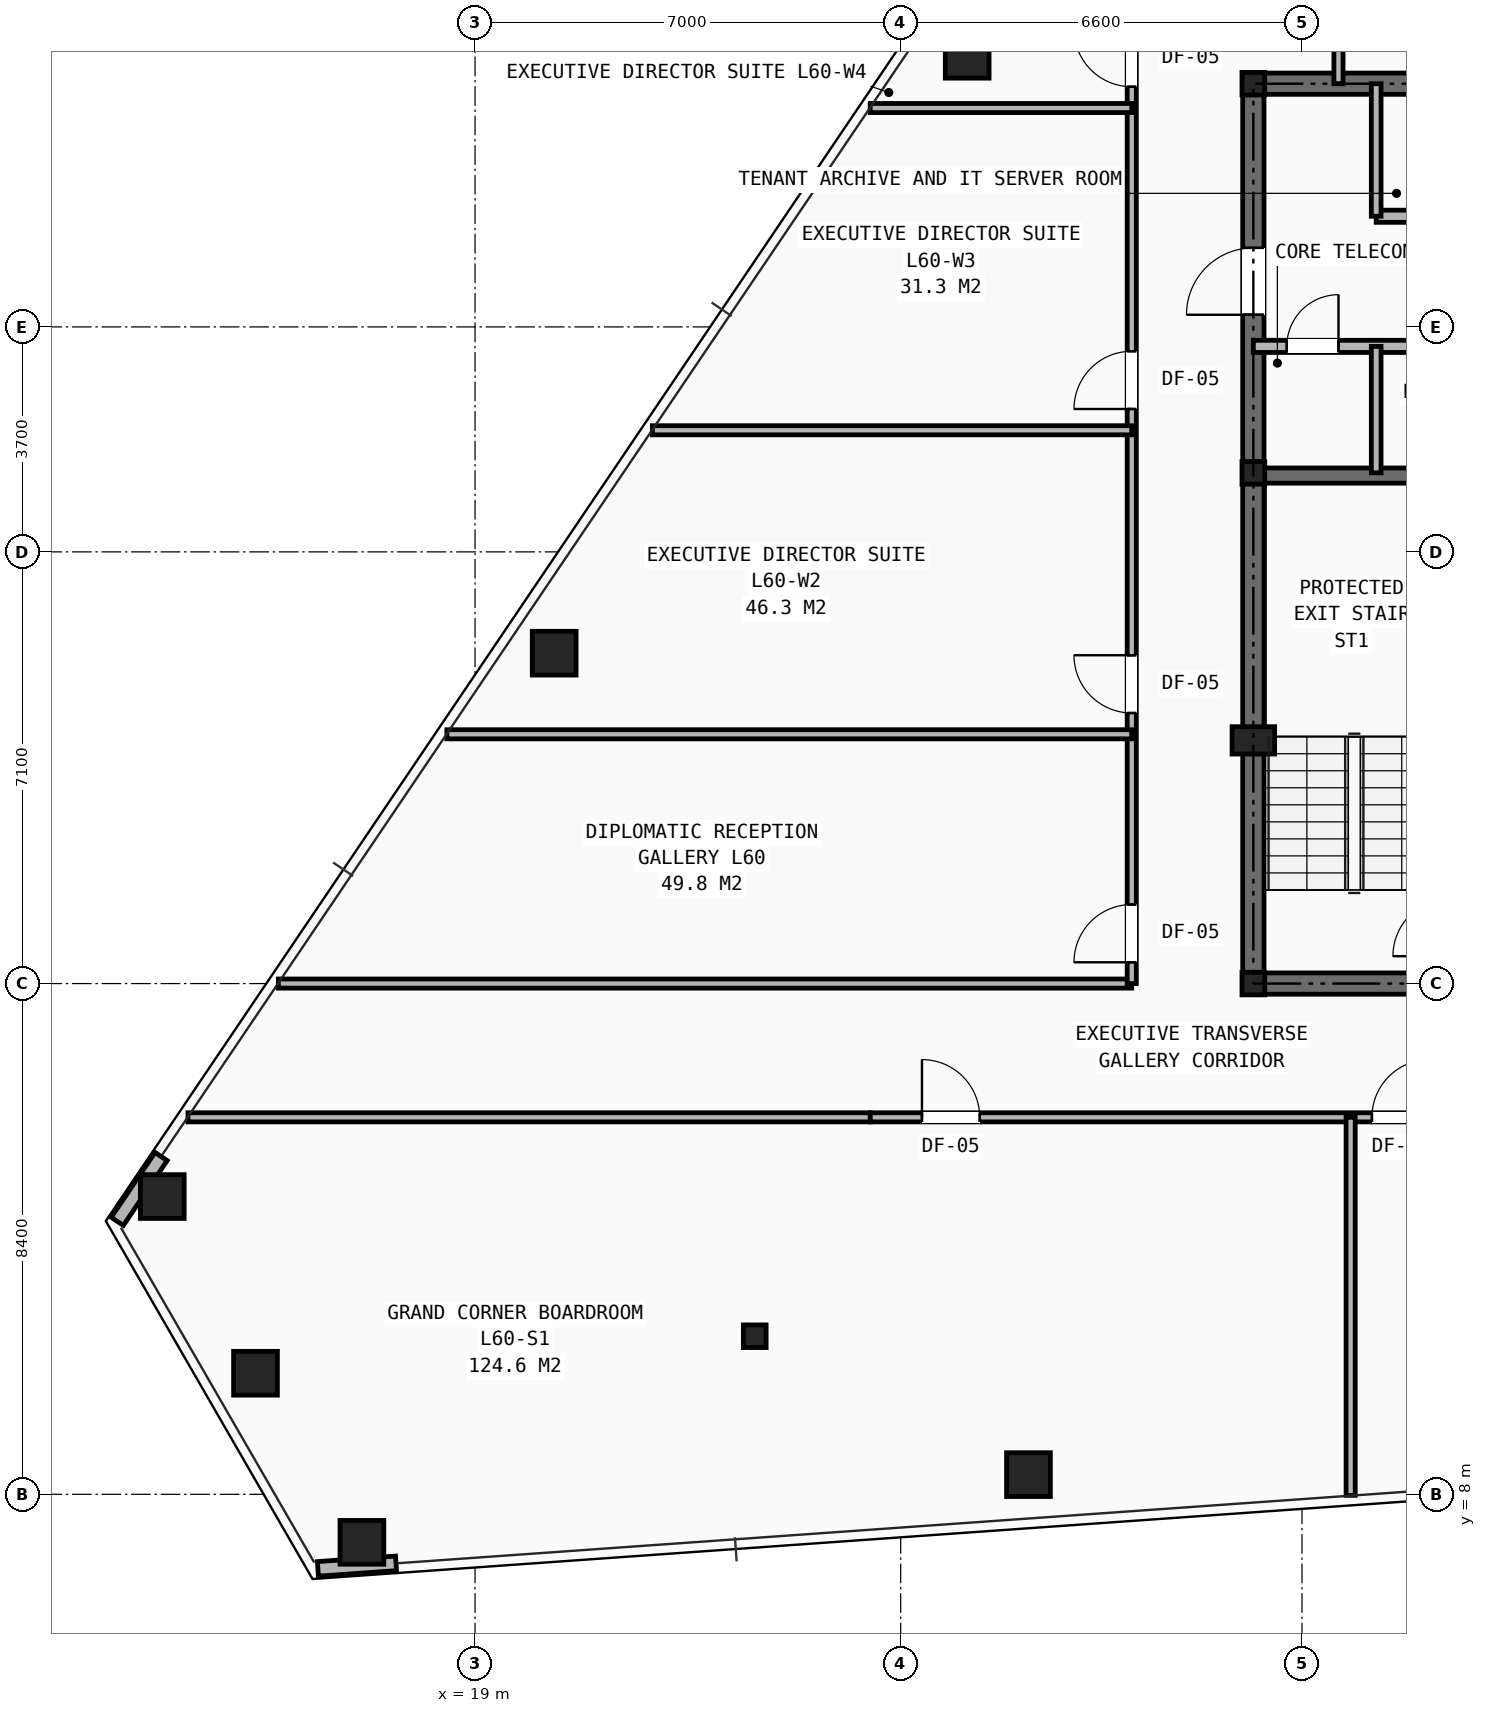
"""IFC4 building model, lengths in metres.
Left out: names, types, materials, properties, quantities, classifications, styles, units other than length and angle.
Written with IfcOpenShell. Run it as: python <this file> out.ifc"""

import sys

from ifc_helpers import new_model, si_unit, direction, frame, frame_2d, origin, origin_2d, place, context, subcontext, project, spatial, rectangle, hollow_rectangle, i_section, extrude, element, fill, save


model = new_model("IFC4")
c1 = context("Model", 3, precision=1e-05, world=origin(), true_north=direction((0.0, 1.0)))
c2 = subcontext(c1, "Body", "Model", "MODEL_VIEW")
j1 = project(units=[si_unit("LENGTHUNIT", "METRE"), si_unit("PLANEANGLEUNIT", "RADIAN")], contexts=[c1])
p1 = place(None, origin())
s1 = spatial("IfcSite", under=j1, at=p1, CompositionType="ELEMENT")
p2 = place(p1, origin())
s2 = spatial("IfcBuilding", under=s1, at=p2, CompositionType="ELEMENT")
p3 = place(p2, frame((0.0, 0.0, 211.9)))
s3 = spatial("IfcBuildingStorey", under=s2, at=p3, CompositionType="ELEMENT", Elevation=211.9)
for number, where, z_axis, x_axis in (
    (1, (31.8, 16.4, 0.0), (0.0, 0.0, 1.0), (1.0, 0.0, 0.0)),
    (2, (31.8, 24.8, 0.0), (0.0, 0.0, 1.0), (1.0, 0.0, 0.0)),
    (3, (31.8, 31.2, 0.0), (0.0, 0.0, 1.0), (1.0, 0.0, 0.0)),
    (4, (23.6, 10.6, 0.0), (0.0, 0.0, 1.0), (1.0, 0.0, 0.0)),
):
    element("IfcColumn", number, at=place(p3, frame(where, z_axis=z_axis, x_axis=x_axis)), inside=s3, PredefinedType="COLUMN", context=c2, shape_type="SweptSolid", body=[
        extrude(i_section(OverallWidth=0.374, OverallDepth=0.372, WebThickness=0.016, FlangeThickness=0.026, at=origin_2d()), origin(), (0.0, 0.0, 1.0), 3.5),
    ])
p4 = place(p3, frame((31.8, 20.4, 0.0), z_axis=(0.0, 0.0, 1.0), x_axis=(1.0, 0.0, 0.0)))
e5 = element("IfcColumn", 5, at=p4, inside=s3, PredefinedType="PILASTER", context=c2, shape_type="SweptSolid", body=[
    extrude(rectangle(XDim=0.7, YDim=0.45, at=origin_2d()), origin(), (0.0, 0.0, 1.0), 3.5),
])
for number, where, z_axis, x_axis in (
    (6, (27.094, 31.652, 0.0), (0.0, 0.0, 1.0), (1.0, 0.0, 0.0)),
    (7, (20.302, 21.834, 0.0), (0.0, 0.0, 1.0), (1.0, 0.0, 0.0)),
    (8, (13.856, 12.897, 0.0), (0.0, 0.0, 1.0), (1.0, 0.0, 0.0)),
    (9, (15.389, 9.991, 0.0), (0.0, 0.0, 1.0), (1.0, 0.0, 0.0)),
    (10, (17.14, 7.21, 0.0), (0.0, 0.0, 1.0), (1.0, 0.0, 0.0)),
    (11, (28.102, 8.323, 0.0), (0.0, 0.0, 1.0), (1.0, 0.0, 0.0)),
):
    element("IfcColumn", number, at=place(p3, frame(where, z_axis=z_axis, x_axis=x_axis)), inside=s3, PredefinedType="COLUMN", context=c2, shape_type="SweptSolid", body=[
        extrude(hollow_rectangle(XDim=0.72, YDim=0.72, WallThickness=0.05, at=origin_2d()), origin(), (0.0, 0.0, 1.0), 3.5),
    ])
p5 = place(p3, frame((13.837, 13.556, 0.0), z_axis=(0.0, 0.0, 1.0), x_axis=(-0.559984079849, -0.828503367715, 0.0)))
e12 = element("IfcWall", 12, at=p5, inside=s3, PredefinedType="SHEAR", context=c2, shape_type="SweptSolid", body=[
    extrude(rectangle(XDim=1.287, YDim=0.24, at=frame_2d((0.644, 0.0))), origin(), (0.0, 0.0, 1.0), 2.623),
])
p6 = place(p3, frame((16.416, 6.773, 0.0), z_axis=(0.0, 0.0, 1.0), x_axis=(0.997482703795, 0.070910194111, 0.0)))
e13 = element("IfcWall", 13, at=p6, inside=s3, PredefinedType="SHEAR", context=c2, shape_type="SweptSolid", body=[
    extrude(rectangle(XDim=1.288, YDim=0.24, at=frame_2d((0.644, 0.0))), origin(), (0.0, 0.0, 1.0), 2.623),
])
p7 = place(p3, frame((31.8, 16.4, 0.0), z_axis=(0.0, 0.0, 1.0), x_axis=(1.0, 0.0, 0.0)))
e14 = element("IfcWall", 14, at=p7, inside=s3, PredefinedType="SHEAR", context=c2, shape_type="SweptSolid", body=[
    extrude(rectangle(XDim=16.4, YDim=0.35, at=frame_2d((8.2, 0.0))), origin(), (0.0, 0.0, 1.0), 3.25),
])
p8 = place(p7, frame((7.75, 0.0, 0.0)))
e15 = element("IfcOpeningElement", 15, at=p8, cuts=e14, PredefinedType="OPENING", context=c2, shape_type="SweptSolid", body=[
    extrude(rectangle(XDim=0.9, YDim=2.1, at=frame_2d((0.45, 1.05))), frame((0.0, 0.185, 0.0), z_axis=(0.0, -1.0, 0.0), x_axis=(1.0, 0.0, 0.0)), (0.0, 0.0, 1.0), 0.37),
])
p9 = place(p7, frame((4.2, 0.0, 0.0)))
e16 = element("IfcOpeningElement", 16, at=p9, cuts=e14, PredefinedType="OPENING", context=c2, shape_type="SweptSolid", body=[
    extrude(rectangle(XDim=0.95, YDim=2.1, at=frame_2d((0.475, 1.05))), frame((0.0, 0.185, 0.0), z_axis=(0.0, -1.0, 0.0), x_axis=(1.0, 0.0, 0.0)), (0.0, 0.0, 1.0), 0.37),
])
p10 = place(p7, frame((10.6, 0.0, 0.0)))
e17 = element("IfcOpeningElement", 17, at=p10, cuts=e14, PredefinedType="OPENING", context=c2, shape_type="SweptSolid", body=[
    extrude(rectangle(XDim=0.95, YDim=2.1, at=frame_2d((0.475, 1.05))), frame((0.0, 0.185, 0.0), z_axis=(0.0, -1.0, 0.0), x_axis=(1.0, 0.0, 0.0)), (0.0, 0.0, 1.0), 0.37),
])
p11 = place(p3, frame((31.8, 31.2, 0.0), z_axis=(0.0, 0.0, 1.0), x_axis=(1.0, 0.0, 0.0)))
e18 = element("IfcWall", 18, at=p11, inside=s3, PredefinedType="SHEAR", context=c2, shape_type="SweptSolid", body=[
    extrude(rectangle(XDim=16.4, YDim=0.35, at=frame_2d((8.2, 0.0))), origin(), (0.0, 0.0, 1.0), 3.25),
])
p12 = place(p3, frame((31.8, 16.4, 0.0), z_axis=(0.0, 0.0, 1.0), x_axis=(0.0, 1.0, 0.0)))
e19 = element("IfcWall", 19, at=p12, inside=s3, PredefinedType="SHEAR", context=c2, shape_type="SweptSolid", body=[
    extrude(rectangle(XDim=14.8, YDim=0.35, at=frame_2d((7.4, 0.0))), origin(), (0.0, 0.0, 1.0), 3.25),
])
p13 = place(p12, frame((11.0, 0.0, 0.0)))
e20 = element("IfcOpeningElement", 20, at=p13, cuts=e19, PredefinedType="OPENING", context=c2, shape_type="SweptSolid", body=[
    extrude(rectangle(XDim=1.1, YDim=2.15, at=frame_2d((0.55, 1.075))), frame((0.0, 0.185, 0.0), z_axis=(0.0, -1.0, 0.0), x_axis=(1.0, 0.0, 0.0)), (0.0, 0.0, 1.0), 0.37),
])
p14 = place(p3, frame((31.8, 24.755, 0.0), z_axis=(0.0, 0.0, 1.0), x_axis=(1.0, 0.0, 0.0)))
e21 = element("IfcWall", 21, at=p14, inside=s3, PredefinedType="SHEAR", context=c2, shape_type="SweptSolid", body=[
    extrude(rectangle(XDim=3.245, YDim=0.25, at=frame_2d((1.623, 0.0))), origin(), (0.0, 0.0, 1.0), 3.25),
])
p15 = place(p3, frame((33.82, 29.02, 0.0), z_axis=(0.0, 0.0, 1.0), x_axis=(1.0, 0.0, 0.0)))
e22 = element("IfcWall", 22, at=p15, inside=s3, PredefinedType="SOLIDWALL", context=c2, shape_type="SweptSolid", body=[
    extrude(rectangle(XDim=14.38, YDim=0.2, at=frame_2d((7.19, 0.0))), origin(), (0.0, 0.0, 1.0), 2.705),
])
p16 = place(p15, frame((1.78, 0.0, 0.0)))
e23 = element("IfcOpeningElement", 23, at=p16, cuts=e22, PredefinedType="OPENING", context=c2, shape_type="SweptSolid", body=[
    extrude(rectangle(XDim=0.9, YDim=2.1, at=frame_2d((0.45, 1.05))), frame((0.0, 0.11, 0.0), z_axis=(0.0, -1.0, 0.0), x_axis=(1.0, 0.0, 0.0)), (0.0, 0.0, 1.0), 0.22),
])
p17 = place(p15, frame((6.07, 0.0, 0.0)))
e24 = element("IfcOpeningElement", 24, at=p17, cuts=e22, PredefinedType="OPENING", context=c2, shape_type="SweptSolid", body=[
    extrude(rectangle(XDim=0.9, YDim=2.1, at=frame_2d((0.45, 1.05))), frame((0.0, 0.11, 0.0), z_axis=(0.0, -1.0, 0.0), x_axis=(1.0, 0.0, 0.0)), (0.0, 0.0, 1.0), 0.22),
])
p18 = place(p15, frame((9.39, 0.0, 0.0)))
e25 = element("IfcOpeningElement", 25, at=p18, cuts=e22, PredefinedType="OPENING", context=c2, shape_type="SweptSolid", body=[
    extrude(rectangle(XDim=1.1, YDim=2.15, at=frame_2d((0.55, 1.075))), frame((0.0, 0.11, 0.0), z_axis=(0.0, -1.0, 0.0), x_axis=(1.0, 0.0, 0.0)), (0.0, 0.0, 1.0), 0.22),
])
p19 = place(p15, frame((11.71, 0.0, 0.0)))
e26 = element("IfcOpeningElement", 26, at=p19, cuts=e22, PredefinedType="OPENING", context=c2, shape_type="SweptSolid", body=[
    extrude(rectangle(XDim=1.1, YDim=2.15, at=frame_2d((0.55, 1.075))), frame((0.0, 0.11, 0.0), z_axis=(0.0, -1.0, 0.0), x_axis=(1.0, 0.0, 0.0)), (0.0, 0.0, 1.0), 0.22),
])
p20 = place(p3, frame((31.8, 26.88, 0.0), z_axis=(0.0, 0.0, 1.0), x_axis=(1.0, 0.0, 0.0)))
e27 = element("IfcWall", 27, at=p20, inside=s3, PredefinedType="SOLIDWALL", context=c2, shape_type="SweptSolid", body=[
    extrude(rectangle(XDim=16.4, YDim=0.2, at=frame_2d((8.2, 0.0))), origin(), (0.0, 0.0, 1.0), 2.705),
])
p21 = place(p20, frame((0.55, 0.0, 0.0)))
e28 = element("IfcOpeningElement", 28, at=p21, cuts=e27, PredefinedType="OPENING", context=c2, shape_type="SweptSolid", body=[
    extrude(rectangle(XDim=0.85, YDim=2.05, at=frame_2d((0.425, 1.025))), frame((0.0, 0.11, 0.0), z_axis=(0.0, -1.0, 0.0), x_axis=(1.0, 0.0, 0.0)), (0.0, 0.0, 1.0), 0.22),
])
p22 = place(p20, frame((5.94, 0.0, 0.0)))
e29 = element("IfcOpeningElement", 29, at=p22, cuts=e27, PredefinedType="OPENING", context=c2, shape_type="SweptSolid", body=[
    extrude(rectangle(XDim=0.9, YDim=2.1, at=frame_2d((0.45, 1.05))), frame((0.0, 0.11, 0.0), z_axis=(0.0, -1.0, 0.0), x_axis=(1.0, 0.0, 0.0)), (0.0, 0.0, 1.0), 0.22),
])
p23 = place(p20, frame((11.41, 0.0, 0.0)))
e30 = element("IfcOpeningElement", 30, at=p23, cuts=e27, PredefinedType="OPENING", context=c2, shape_type="SweptSolid", body=[
    extrude(rectangle(XDim=1.1, YDim=2.15, at=frame_2d((0.55, 1.075))), frame((0.0, 0.11, 0.0), z_axis=(0.0, -1.0, 0.0), x_axis=(1.0, 0.0, 0.0)), (0.0, 0.0, 1.0), 0.22),
])
p24 = place(p20, frame((13.73, 0.0, 0.0)))
e31 = element("IfcOpeningElement", 31, at=p24, cuts=e27, PredefinedType="OPENING", context=c2, shape_type="SweptSolid", body=[
    extrude(rectangle(XDim=1.1, YDim=2.15, at=frame_2d((0.55, 1.075))), frame((0.0, 0.11, 0.0), z_axis=(0.0, -1.0, 0.0), x_axis=(1.0, 0.0, 0.0)), (0.0, 0.0, 1.0), 0.22),
])
p25 = place(p3, frame((33.82, 29.02, 0.0), z_axis=(0.0, 0.0, 1.0), x_axis=(0.0, 1.0, 0.0)))
e32 = element("IfcWall", 32, at=p25, inside=s3, PredefinedType="SOLIDWALL", context=c2, shape_type="SweptSolid", body=[
    extrude(rectangle(XDim=2.18, YDim=0.16, at=frame_2d((1.09, 0.0))), origin(), (0.0, 0.0, 1.0), 2.978),
])
p26 = place(p3, frame((33.82, 24.8, 0.0), z_axis=(0.0, 0.0, 1.0), x_axis=(0.0, 1.0, 0.0)))
e33 = element("IfcWall", 33, at=p26, inside=s3, PredefinedType="SOLIDWALL", context=c2, shape_type="SweptSolid", body=[
    extrude(rectangle(XDim=2.08, YDim=0.16, at=frame_2d((1.04, 0.0))), origin(), (0.0, 0.0, 1.0), 3.25),
])
p27 = place(p3, frame((33.2, 31.2, 0.0), z_axis=(0.0, 0.0, 1.0), x_axis=(0.0, 1.0, 0.0)))
e34 = element("IfcWall", 34, at=p27, inside=s3, PredefinedType="PARTITIONING", context=c2, shape_type="SweptSolid", body=[
    extrude(rectangle(XDim=2.6, YDim=0.15, at=frame_2d((1.3, 0.0))), origin(), (0.0, 0.0, 1.0), 2.978),
])
p28 = place(p3, frame((14.279, 14.2, 0.0), z_axis=(0.0, 0.0, 1.0), x_axis=(1.0, 0.0, 0.0)))
e35 = element("IfcWall", 35, at=p28, inside=s3, PredefinedType="PARTITIONING", context=c2, shape_type="SweptSolid", body=[
    extrude(rectangle(XDim=11.221, YDim=0.15, at=frame_2d((5.611, 0.0))), origin(), (0.0, 0.0, 1.0), 2.265),
])
p29 = place(p3, frame((15.766, 16.4, 0.0), z_axis=(0.0, 0.0, 1.0), x_axis=(1.0, 0.0, 0.0)))
e36 = element("IfcWall", 36, at=p29, inside=s3, PredefinedType="PARTITIONING", context=c2, shape_type="SweptSolid", body=[
    extrude(rectangle(XDim=14.034, YDim=0.15, at=frame_2d((7.017, 0.0))), origin(), (0.0, 0.0, 1.0), 2.265),
])
p30 = place(p3, frame((29.8, 16.4, 0.0), z_axis=(0.0, 0.0, 1.0), x_axis=(0.0, 1.0, 0.0)))
e37 = element("IfcWall", 37, at=p30, inside=s3, PredefinedType="PARTITIONING", context=c2, shape_type="SweptSolid", body=[
    extrude(rectangle(XDim=19.3, YDim=0.15, at=frame_2d((9.65, 0.0))), origin(), (0.0, 0.0, 1.0), 2.265),
])
p31 = place(p30, frame((0.35, 0.0, 0.0)))
e38 = element("IfcOpeningElement", 38, at=p31, cuts=e37, PredefinedType="OPENING", context=c2, shape_type="SweptSolid", body=[
    extrude(rectangle(XDim=0.95, YDim=2.1, at=frame_2d((0.475, 1.05))), frame((0.0, 0.085, 0.0), z_axis=(0.0, -1.0, 0.0), x_axis=(1.0, 0.0, 0.0)), (0.0, 0.0, 1.0), 0.17),
])
p32 = place(p30, frame((4.45, 0.0, 0.0)))
e39 = element("IfcOpeningElement", 39, at=p32, cuts=e37, PredefinedType="OPENING", context=c2, shape_type="SweptSolid", body=[
    extrude(rectangle(XDim=0.95, YDim=2.1, at=frame_2d((0.475, 1.05))), frame((0.0, 0.085, 0.0), z_axis=(0.0, -1.0, 0.0), x_axis=(1.0, 0.0, 0.0)), (0.0, 0.0, 1.0), 0.17),
])
p33 = place(p30, frame((9.45, 0.0, 0.0)))
e40 = element("IfcOpeningElement", 40, at=p33, cuts=e37, PredefinedType="OPENING", context=c2, shape_type="SweptSolid", body=[
    extrude(rectangle(XDim=0.95, YDim=2.1, at=frame_2d((0.475, 1.05))), frame((0.0, 0.085, 0.0), z_axis=(0.0, -1.0, 0.0), x_axis=(1.0, 0.0, 0.0)), (0.0, 0.0, 1.0), 0.17),
])
p34 = place(p30, frame((14.75, 0.0, 0.0)))
e41 = element("IfcOpeningElement", 41, at=p34, cuts=e37, PredefinedType="OPENING", context=c2, shape_type="SweptSolid", body=[
    extrude(rectangle(XDim=0.95, YDim=2.1, at=frame_2d((0.475, 1.05))), frame((0.0, 0.085, 0.0), z_axis=(0.0, -1.0, 0.0), x_axis=(1.0, 0.0, 0.0)), (0.0, 0.0, 1.0), 0.17),
])
p35 = place(p3, frame((25.5, 14.2, 0.0), z_axis=(0.0, 0.0, 1.0), x_axis=(1.0, 0.0, 0.0)))
e42 = element("IfcWall", 42, at=p35, inside=s3, PredefinedType="PARTITIONING", context=c2, shape_type="SweptSolid", body=[
    extrude(rectangle(XDim=29.0, YDim=0.15, at=frame_2d((14.5, 0.0))), origin(), (0.0, 0.0, 1.0), 2.265),
])
p36 = place(p35, frame((0.85, 0.0, 0.0)))
e43 = element("IfcOpeningElement", 43, at=p36, cuts=e42, PredefinedType="OPENING", context=c2, shape_type="SweptSolid", body=[
    extrude(rectangle(XDim=0.95, YDim=2.1, at=frame_2d((0.475, 1.05))), frame((0.0, 0.085, 0.0), z_axis=(0.0, -1.0, 0.0), x_axis=(1.0, 0.0, 0.0)), (0.0, 0.0, 1.0), 0.17),
])
p37 = place(p35, frame((8.25, 0.0, 0.0)))
e44 = element("IfcOpeningElement", 44, at=p37, cuts=e42, PredefinedType="OPENING", context=c2, shape_type="SweptSolid", body=[
    extrude(rectangle(XDim=0.95, YDim=2.1, at=frame_2d((0.475, 1.05))), frame((0.0, 0.085, 0.0), z_axis=(0.0, -1.0, 0.0), x_axis=(1.0, 0.0, 0.0)), (0.0, 0.0, 1.0), 0.17),
])
p38 = place(p35, frame((13.05, 0.0, 0.0)))
e45 = element("IfcOpeningElement", 45, at=p38, cuts=e42, PredefinedType="OPENING", context=c2, shape_type="SweptSolid", body=[
    extrude(rectangle(XDim=0.95, YDim=2.1, at=frame_2d((0.475, 1.05))), frame((0.0, 0.085, 0.0), z_axis=(0.0, -1.0, 0.0), x_axis=(1.0, 0.0, 0.0)), (0.0, 0.0, 1.0), 0.17),
])
p39 = place(p35, frame((18.05, 0.0, 0.0)))
e46 = element("IfcOpeningElement", 46, at=p39, cuts=e42, PredefinedType="OPENING", context=c2, shape_type="SweptSolid", body=[
    extrude(rectangle(XDim=0.95, YDim=2.1, at=frame_2d((0.475, 1.05))), frame((0.0, 0.085, 0.0), z_axis=(0.0, -1.0, 0.0), x_axis=(1.0, 0.0, 0.0)), (0.0, 0.0, 1.0), 0.17),
])
p40 = place(p3, frame((33.4, 7.982, 0.0), z_axis=(0.0, 0.0, 1.0), x_axis=(0.0, 1.0, 0.0)))
e47 = element("IfcWall", 47, at=p40, inside=s3, PredefinedType="PARTITIONING", context=c2, shape_type="SweptSolid", body=[
    extrude(rectangle(XDim=6.218, YDim=0.15, at=frame_2d((3.109, 0.0))), origin(), (0.0, 0.0, 1.0), 2.628),
])
p41 = place(p3, frame((18.537, 20.5, 0.0), z_axis=(0.0, 0.0, 1.0), x_axis=(1.0, 0.0, 0.0)))
e48 = element("IfcWall", 48, at=p41, inside=s3, PredefinedType="PARTITIONING", context=c2, shape_type="SweptSolid", body=[
    extrude(rectangle(XDim=11.263, YDim=0.15, at=frame_2d((5.632, 0.0))), origin(), (0.0, 0.0, 1.0), 2.265),
])
p42 = place(p3, frame((21.917, 25.5, 0.0), z_axis=(0.0, 0.0, 1.0), x_axis=(1.0, 0.0, 0.0)))
e49 = element("IfcWall", 49, at=p42, inside=s3, PredefinedType="PARTITIONING", context=c2, shape_type="SweptSolid", body=[
    extrude(rectangle(XDim=7.884, YDim=0.15, at=frame_2d((3.942, 0.0))), origin(), (0.0, 0.0, 1.0), 2.628),
])
p43 = place(p3, frame((25.499, 30.8, 0.0), z_axis=(0.0, 0.0, 1.0), x_axis=(1.0, 0.0, 0.0)))
e50 = element("IfcWall", 50, at=p43, inside=s3, PredefinedType="PARTITIONING", context=c2, shape_type="SweptSolid", body=[
    extrude(rectangle(XDim=4.301, YDim=0.15, at=frame_2d((2.151, 0.0))), origin(), (0.0, 0.0, 1.0), 2.628),
])
p44 = place(p21, origin())
e51 = element("IfcDoor", 51, at=p44, inside=s3, OperationType="SINGLE_SWING_RIGHT", PredefinedType="DOOR", context=c2, shape_type="SweptSolid", body=[
    extrude(rectangle(XDim=0.85, YDim=2.05, at=frame_2d((0.425, 1.025))), frame((0.0, 0.025, 0.0), z_axis=(0.0, -1.0, 0.0), x_axis=(1.0, 0.0, 0.0)), (0.0, 0.0, 1.0), 0.05),
])
fill(e28, e51)
p45 = place(p13, origin())
e52 = element("IfcDoor", 52, at=p45, inside=s3, OperationType="SINGLE_SWING_LEFT", PredefinedType="DOOR", context=c2, shape_type="SweptSolid", body=[
    extrude(rectangle(XDim=1.1, YDim=2.15, at=frame_2d((0.55, 1.075))), frame((0.0, 0.025, 0.0), z_axis=(0.0, -1.0, 0.0), x_axis=(1.0, 0.0, 0.0)), (0.0, 0.0, 1.0), 0.05),
])
fill(e20, e52)
p46 = place(p36, origin())
e53 = element("IfcDoor", 53, at=p46, inside=s3, OperationType="SINGLE_SWING_LEFT", PredefinedType="DOOR", context=c2, shape_type="SweptSolid", body=[
    extrude(rectangle(XDim=0.95, YDim=2.1, at=frame_2d((0.475, 1.05))), frame((0.0, 0.025, 0.0), z_axis=(0.0, -1.0, 0.0), x_axis=(1.0, 0.0, 0.0)), (0.0, 0.0, 1.0), 0.05),
])
fill(e43, e53)
p47 = place(p37, origin())
e54 = element("IfcDoor", 54, at=p47, inside=s3, OperationType="SINGLE_SWING_RIGHT", PredefinedType="DOOR", context=c2, shape_type="SweptSolid", body=[
    extrude(rectangle(XDim=0.95, YDim=2.1, at=frame_2d((0.475, 1.05))), frame((0.0, 0.025, 0.0), z_axis=(0.0, -1.0, 0.0), x_axis=(1.0, 0.0, 0.0)), (0.0, 0.0, 1.0), 0.05),
])
fill(e44, e54)
p48 = place(p31, origin())
e55 = element("IfcDoor", 55, at=p48, inside=s3, OperationType="SINGLE_SWING_LEFT", PredefinedType="DOOR", context=c2, shape_type="SweptSolid", body=[
    extrude(rectangle(XDim=0.95, YDim=2.1, at=frame_2d((0.475, 1.05))), frame((0.0, 0.025, 0.0), z_axis=(0.0, -1.0, 0.0), x_axis=(1.0, 0.0, 0.0)), (0.0, 0.0, 1.0), 0.05),
])
fill(e38, e55)
p49 = place(p32, origin())
e56 = element("IfcDoor", 56, at=p49, inside=s3, OperationType="SINGLE_SWING_RIGHT", PredefinedType="DOOR", context=c2, shape_type="SweptSolid", body=[
    extrude(rectangle(XDim=0.95, YDim=2.1, at=frame_2d((0.475, 1.05))), frame((0.0, 0.025, 0.0), z_axis=(0.0, -1.0, 0.0), x_axis=(1.0, 0.0, 0.0)), (0.0, 0.0, 1.0), 0.05),
])
fill(e39, e56)
p50 = place(p33, origin())
e57 = element("IfcDoor", 57, at=p50, inside=s3, OperationType="SINGLE_SWING_LEFT", PredefinedType="DOOR", context=c2, shape_type="SweptSolid", body=[
    extrude(rectangle(XDim=0.95, YDim=2.1, at=frame_2d((0.475, 1.05))), frame((0.0, 0.025, 0.0), z_axis=(0.0, -1.0, 0.0), x_axis=(1.0, 0.0, 0.0)), (0.0, 0.0, 1.0), 0.05),
])
fill(e40, e57)
p51 = place(p34, origin())
e58 = element("IfcDoor", 58, at=p51, inside=s3, OperationType="SINGLE_SWING_RIGHT", PredefinedType="DOOR", context=c2, shape_type="SweptSolid", body=[
    extrude(rectangle(XDim=0.95, YDim=2.1, at=frame_2d((0.475, 1.05))), frame((0.0, 0.025, 0.0), z_axis=(0.0, -1.0, 0.0), x_axis=(1.0, 0.0, 0.0)), (0.0, 0.0, 1.0), 0.05),
])
fill(e41, e58)
save(model, sys.argv[1])
